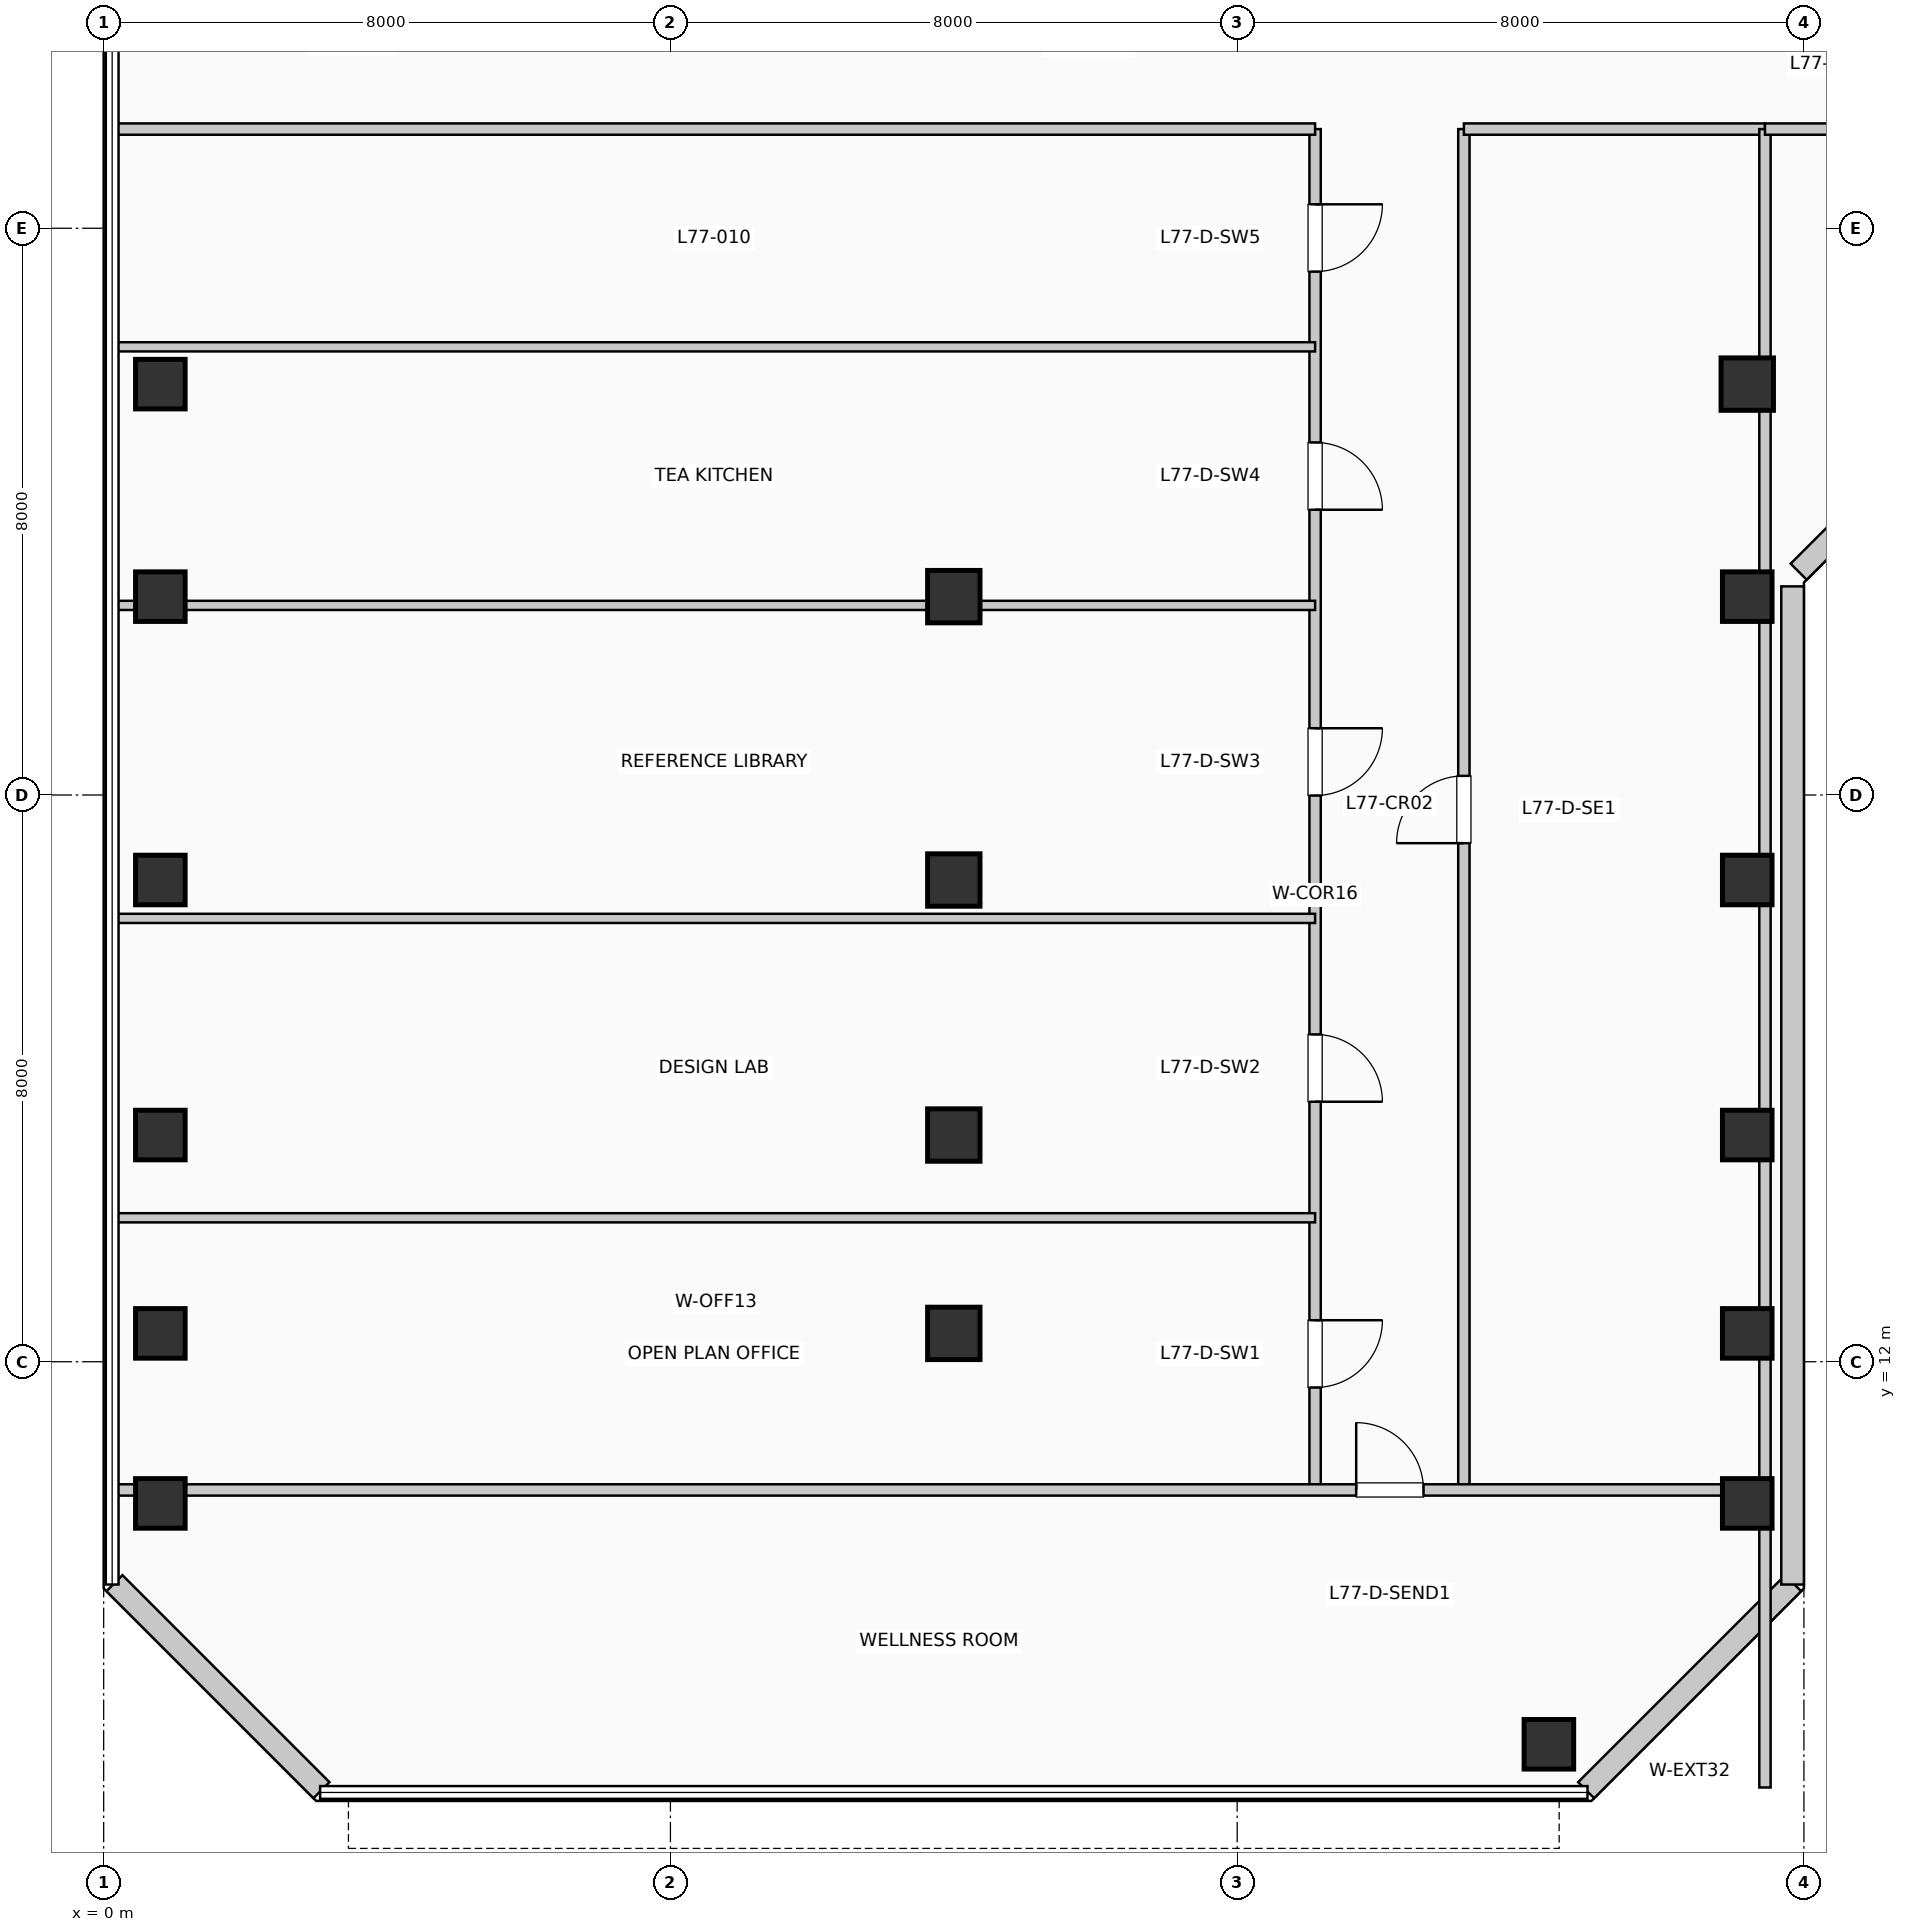
"""IFC4 building model, lengths in metres.
Left out: names, types, materials, properties, quantities, classifications, styles, units other than length and angle.
Written with IfcOpenShell. Run it as: python <this file> out.ifc"""

import sys

from ifc_helpers import new_model, si_unit, direction, frame, frame_2d, origin, origin_2d, place, context, subcontext, project, spatial, rectangle, extrude, element, fill, save


model = new_model("IFC4")
c1 = context("Model", 3, precision=1e-05, world=origin(), true_north=direction((0.0, 1.0)))
c2 = subcontext(c1, "Body", "Model", "MODEL_VIEW")
j1 = project(units=[si_unit("LENGTHUNIT", "METRE"), si_unit("PLANEANGLEUNIT", "RADIAN")], contexts=[c1])
p1 = place(None, origin())
s1 = spatial("IfcSite", under=j1, at=p1, CompositionType="ELEMENT")
p2 = place(p1, origin())
s2 = spatial("IfcBuilding", under=s1, at=p2, CompositionType="ELEMENT")
p3 = place(p2, frame((0.0, 0.0, 315.81)))
s3 = spatial("IfcBuildingStorey", under=s2, at=p3, CompositionType="ELEMENT", Elevation=315.81)
for number, where, z_axis, x_axis in (
    (1, (0.8, 10.0, 0.0), (0.0, 0.0, 1.0), (1.0, 0.0, 0.0)),
    (2, (0.8, 12.4, 0.0), (0.0, 0.0, 1.0), (1.0, 0.0, 0.0)),
    (3, (0.8, 15.2, 0.0), (0.0, 0.0, 1.0), (1.0, 0.0, 0.0)),
    (4, (0.8, 18.8, 0.0), (0.0, 0.0, 1.0), (1.0, 0.0, 0.0)),
    (5, (0.8, 22.8, 0.0), (0.0, 0.0, 1.0), (1.0, 0.0, 0.0)),
    (6, (0.8, 25.8, 0.0), (0.0, 0.0, 1.0), (1.0, 0.0, 0.0)),
):
    element("IfcColumn", number, at=place(p3, frame(where, z_axis=z_axis, x_axis=x_axis)), inside=s3, PredefinedType="COLUMN", context=c2, shape_type="SweptSolid", body=[
        extrude(rectangle(XDim=0.7, YDim=0.7, at=origin_2d()), origin(), (0.0, 0.0, 1.0), 3.96),
    ])
for number, where, z_axis, x_axis in (
    (7, (12.0, 12.4, 0.0), (0.0, 0.0, 1.0), (1.0, 0.0, 0.0)),
    (8, (12.0, 15.2, 0.0), (0.0, 0.0, 1.0), (1.0, 0.0, 0.0)),
    (9, (12.0, 18.8, 0.0), (0.0, 0.0, 1.0), (1.0, 0.0, 0.0)),
    (10, (12.0, 22.8, 0.0), (0.0, 0.0, 1.0), (1.0, 0.0, 0.0)),
):
    element("IfcColumn", number, at=place(p3, frame(where, z_axis=z_axis, x_axis=x_axis)), inside=s3, PredefinedType="COLUMN", context=c2, shape_type="SweptSolid", body=[
        extrude(rectangle(XDim=0.74, YDim=0.74, at=origin_2d()), origin(), (0.0, 0.0, 1.0), 3.96),
    ])
for number, where, z_axis, x_axis in (
    (11, (20.4, 6.6, 0.0), (0.0, 0.0, 1.0), (1.0, 0.0, 0.0)),
    (12, (23.2, 10.0, 0.0), (0.0, 0.0, 1.0), (1.0, 0.0, 0.0)),
    (13, (23.2, 12.4, 0.0), (0.0, 0.0, 1.0), (1.0, 0.0, 0.0)),
    (14, (23.2, 15.2, 0.0), (0.0, 0.0, 1.0), (1.0, 0.0, 0.0)),
    (15, (23.2, 18.8, 0.0), (0.0, 0.0, 1.0), (1.0, 0.0, 0.0)),
    (16, (23.2, 22.8, 0.0), (0.0, 0.0, 1.0), (1.0, 0.0, 0.0)),
):
    element("IfcColumn", number, at=place(p3, frame(where, z_axis=z_axis, x_axis=x_axis)), inside=s3, PredefinedType="COLUMN", context=c2, shape_type="SweptSolid", body=[
        extrude(rectangle(XDim=0.7, YDim=0.7, at=origin_2d()), origin(), (0.0, 0.0, 1.0), 3.96),
    ])
p4 = place(p3, frame((23.2, 25.8, 0.0), z_axis=(0.0, 0.0, 1.0), x_axis=(1.0, 0.0, 0.0)))
e17 = element("IfcColumn", 17, at=p4, inside=s3, PredefinedType="COLUMN", context=c2, shape_type="SweptSolid", body=[
    extrude(rectangle(XDim=0.74, YDim=0.74, at=origin_2d()), origin(), (0.0, 0.0, 1.0), 3.96),
])
p5 = place(p3, frame((20.926, 5.952, 0.0), z_axis=(0.0, 0.0, 1.0), x_axis=(0.707077242712, 0.707136318428, 0.0)))
e18 = element("IfcWall", 18, at=p5, inside=s3, PredefinedType="SOLIDWALL", context=c2, shape_type="SweptSolid", body=[
    extrude(rectangle(XDim=4.133, YDim=0.32, at=frame_2d((2.066, 0.0))), origin(), (0.0, 0.0, 1.0), 3.74),
])
p6 = place(p3, frame((23.84, 8.855, 0.0), z_axis=(0.0, 0.0, 1.0), x_axis=(0.0, 1.0, 0.0)))
e19 = element("IfcWall", 19, at=p6, inside=s3, PredefinedType="SOLIDWALL", context=c2, shape_type="SweptSolid", body=[
    extrude(rectangle(XDim=14.09, YDim=0.32, at=frame_2d((7.045, 0.0))), origin(), (0.0, 0.0, 1.0), 3.74),
])
p7 = place(p3, frame((23.926, 23.152, 0.0), z_axis=(0.0, 0.0, 1.0), x_axis=(0.707106781187, 0.707106781187, 0.0)))
e20 = element("IfcWall", 20, at=p7, inside=s3, PredefinedType="SOLIDWALL", context=c2, shape_type="SweptSolid", body=[
    extrude(rectangle(XDim=2.718, YDim=0.32, at=frame_2d((1.359, 0.0))), origin(), (0.0, 0.0, 1.0), 3.74),
])
p8 = place(p3, frame((0.152, 8.874, 0.0), z_axis=(0.0, 0.0, 1.0), x_axis=(0.707077242712, -0.707136318428, 0.0)))
e21 = element("IfcWall", 21, at=p8, inside=s3, PredefinedType="SOLIDWALL", context=c2, shape_type="SweptSolid", body=[
    extrude(rectangle(XDim=4.133, YDim=0.32, at=frame_2d((2.066, 0.0))), origin(), (0.0, 0.0, 1.0), 3.74),
])
p9 = place(p3, frame((17.1, 10.19, 0.0), z_axis=(0.0, 0.0, 1.0), x_axis=(0.0, 1.0, 0.0)))
e22 = element("IfcWall", 22, at=p9, inside=s3, PredefinedType="PARTITIONING", context=c2, shape_type="SweptSolid", body=[
    extrude(rectangle(XDim=19.21, YDim=0.16, at=frame_2d((9.605, 0.0))), origin(), (0.0, 0.0, 1.0), 3.74),
])
p10 = place(p9, frame((2.396, 0.0, 0.0), z_axis=(0.0, 0.0, 1.0), x_axis=(-1.0, 0.0, 0.0)))
e23 = element("IfcOpeningElement", 23, at=p10, cuts=e22, PredefinedType="OPENING", context=c2, shape_type="SweptSolid", body=[
    extrude(rectangle(XDim=0.95, YDim=2.15, at=frame_2d((0.475, 1.075))), frame((0.0, 0.09, 0.0), z_axis=(0.0, -1.0, 0.0), x_axis=(1.0, 0.0, 0.0)), (0.0, 0.0, 1.0), 0.18),
])
p11 = place(p9, frame((6.43, 0.0, 0.0), z_axis=(0.0, 0.0, 1.0), x_axis=(-1.0, 0.0, 0.0)))
e24 = element("IfcOpeningElement", 24, at=p11, cuts=e22, PredefinedType="OPENING", context=c2, shape_type="SweptSolid", body=[
    extrude(rectangle(XDim=0.95, YDim=2.15, at=frame_2d((0.475, 1.075))), frame((0.0, 0.09, 0.0), z_axis=(0.0, -1.0, 0.0), x_axis=(1.0, 0.0, 0.0)), (0.0, 0.0, 1.0), 0.18),
])
p12 = place(p9, frame((10.752, 0.0, 0.0), z_axis=(0.0, 0.0, 1.0), x_axis=(-1.0, 0.0, 0.0)))
e25 = element("IfcOpeningElement", 25, at=p12, cuts=e22, PredefinedType="OPENING", context=c2, shape_type="SweptSolid", body=[
    extrude(rectangle(XDim=0.95, YDim=2.15, at=frame_2d((0.475, 1.075))), frame((0.0, 0.09, 0.0), z_axis=(0.0, -1.0, 0.0), x_axis=(1.0, 0.0, 0.0)), (0.0, 0.0, 1.0), 0.18),
])
p13 = place(p9, frame((14.786, 0.0, 0.0), z_axis=(0.0, 0.0, 1.0), x_axis=(-1.0, 0.0, 0.0)))
e26 = element("IfcOpeningElement", 26, at=p13, cuts=e22, PredefinedType="OPENING", context=c2, shape_type="SweptSolid", body=[
    extrude(rectangle(XDim=0.95, YDim=2.15, at=frame_2d((0.475, 1.075))), frame((0.0, 0.09, 0.0), z_axis=(0.0, -1.0, 0.0), x_axis=(1.0, 0.0, 0.0)), (0.0, 0.0, 1.0), 0.18),
])
p14 = place(p9, frame((18.148, 0.0, 0.0), z_axis=(0.0, 0.0, 1.0), x_axis=(-1.0, 0.0, 0.0)))
e27 = element("IfcOpeningElement", 27, at=p14, cuts=e22, PredefinedType="OPENING", context=c2, shape_type="SweptSolid", body=[
    extrude(rectangle(XDim=0.95, YDim=2.15, at=frame_2d((0.475, 1.075))), frame((0.0, 0.09, 0.0), z_axis=(0.0, -1.0, 0.0), x_axis=(1.0, 0.0, 0.0)), (0.0, 0.0, 1.0), 0.18),
])
p15 = place(p3, frame((19.2, 10.19, 0.0), z_axis=(0.0, 0.0, 1.0), x_axis=(0.0, 1.0, 0.0)))
e28 = element("IfcWall", 28, at=p15, inside=s3, PredefinedType="PARTITIONING", context=c2, shape_type="SweptSolid", body=[
    extrude(rectangle(XDim=19.21, YDim=0.16, at=frame_2d((9.605, 0.0))), origin(), (0.0, 0.0, 1.0), 3.74),
])
p16 = place(p15, frame((9.13, 0.0, 0.0)))
e29 = element("IfcOpeningElement", 29, at=p16, cuts=e28, PredefinedType="OPENING", context=c2, shape_type="SweptSolid", body=[
    extrude(rectangle(XDim=0.95, YDim=2.15, at=frame_2d((0.475, 1.075))), frame((0.0, 0.09, 0.0), z_axis=(0.0, -1.0, 0.0), x_axis=(1.0, 0.0, 0.0)), (0.0, 0.0, 1.0), 0.18),
])
p17 = place(p3, frame((0.19, 10.19, 0.0), z_axis=(0.0, 0.0, 1.0), x_axis=(1.0, 0.0, 0.0)))
e30 = element("IfcWall", 30, at=p17, inside=s3, PredefinedType="PARTITIONING", context=c2, shape_type="SweptSolid", body=[
    extrude(rectangle(XDim=23.26, YDim=0.16, at=frame_2d((11.63, 0.0))), origin(), (0.0, 0.0, 1.0), 3.175),
])
p18 = place(p17, frame((17.49, 0.0, 0.0)))
e31 = element("IfcOpeningElement", 31, at=p18, cuts=e30, PredefinedType="OPENING", context=c2, shape_type="SweptSolid", body=[
    extrude(rectangle(XDim=0.95, YDim=2.15, at=frame_2d((0.475, 1.075))), frame((0.0, 0.09, 0.0), z_axis=(0.0, -1.0, 0.0), x_axis=(1.0, 0.0, 0.0)), (0.0, 0.0, 1.0), 0.18),
])
p19 = place(p3, frame((0.19, 29.4, 0.0), z_axis=(0.0, 0.0, 1.0), x_axis=(1.0, 0.0, 0.0)))
e32 = element("IfcWall", 32, at=p19, inside=s3, PredefinedType="PARTITIONING", context=c2, shape_type="SweptSolid", body=[
    extrude(rectangle(XDim=16.91, YDim=0.16, at=frame_2d((8.455, 0.0))), origin(), (0.0, 0.0, 1.0), 3.425),
])
p20 = place(p3, frame((19.2, 29.4, 0.0), z_axis=(0.0, 0.0, 1.0), x_axis=(1.0, 0.0, 0.0)))
e33 = element("IfcWall", 33, at=p20, inside=s3, PredefinedType="PARTITIONING", context=c2, shape_type="SweptSolid", body=[
    extrude(rectangle(XDim=4.25, YDim=0.16, at=frame_2d((2.125, 0.0))), origin(), (0.0, 0.0, 1.0), 3.425),
])
p21 = place(p3, frame((23.45, 5.99, 0.0), z_axis=(0.0, 0.0, 1.0), x_axis=(0.0, 1.0, 0.0)))
e34 = element("IfcWall", 34, at=p21, inside=s3, PredefinedType="PARTITIONING", context=c2, shape_type="SweptSolid", body=[
    extrude(rectangle(XDim=23.41, YDim=0.16, at=frame_2d((11.705, 0.0))), origin(), (0.0, 0.0, 1.0), 3.175),
])
for number, where, z_axis, x_axis in (
    (35, (0.19, 14.032, 0.0), (0.0, 0.0, 1.0), (1.0, 0.0, 0.0)),
    (36, (0.19, 18.258, 0.0), (0.0, 0.0, 1.0), (1.0, 0.0, 0.0)),
):
    element("IfcWall", number, at=place(p3, frame(where, z_axis=z_axis, x_axis=x_axis)), inside=s3, PredefinedType="PARTITIONING", context=c2, shape_type="SweptSolid", body=[
        extrude(rectangle(XDim=16.91, YDim=0.13, at=frame_2d((8.455, 0.0))), origin(), (0.0, 0.0, 1.0), 3.74),
    ])
p22 = place(p3, frame((0.19, 22.677, 0.0), z_axis=(0.0, 0.0, 1.0), x_axis=(1.0, 0.0, 0.0)))
e37 = element("IfcWall", 37, at=p22, inside=s3, PredefinedType="PARTITIONING", context=c2, shape_type="SweptSolid", body=[
    extrude(rectangle(XDim=16.91, YDim=0.13, at=frame_2d((8.455, 0.0))), origin(), (0.0, 0.0, 1.0), 3.175),
])
p23 = place(p3, frame((0.19, 26.326, 0.0), z_axis=(0.0, 0.0, 1.0), x_axis=(1.0, 0.0, 0.0)))
e38 = element("IfcWall", 38, at=p23, inside=s3, PredefinedType="PARTITIONING", context=c2, shape_type="SweptSolid", body=[
    extrude(rectangle(XDim=16.91, YDim=0.13, at=frame_2d((8.455, 0.0))), origin(), (0.0, 0.0, 1.0), 3.74),
])
p24 = place(p3, frame((23.45, 29.4, 0.0), z_axis=(0.0, 0.0, 1.0), x_axis=(1.0, 0.0, 0.0)))
e39 = element("IfcWall", 39, at=p24, inside=s3, PredefinedType="PARTITIONING", context=c2, shape_type="SweptSolid", body=[
    extrude(rectangle(XDim=4.15, YDim=0.16, at=frame_2d((2.075, 0.0))), origin(), (0.0, 0.0, 1.0), 3.425),
])
p25 = place(p18, origin())
e40 = element("IfcDoor", 40, at=p25, inside=s3, OperationType="SINGLE_SWING_LEFT", PredefinedType="DOOR", context=c2, shape_type="SweptSolid", body=[
    extrude(rectangle(XDim=0.95, YDim=2.15, at=frame_2d((0.475, 1.075))), frame((0.0, 0.025, 0.0), z_axis=(0.0, -1.0, 0.0), x_axis=(1.0, 0.0, 0.0)), (0.0, 0.0, 1.0), 0.05),
])
fill(e31, e40)
p26 = place(p10, origin())
e41 = element("IfcDoor", 41, at=p26, inside=s3, OperationType="SINGLE_SWING_RIGHT", PredefinedType="DOOR", context=c2, shape_type="SweptSolid", body=[
    extrude(rectangle(XDim=0.95, YDim=2.15, at=frame_2d((0.475, 1.075))), frame((0.0, 0.025, 0.0), z_axis=(0.0, -1.0, 0.0), x_axis=(1.0, 0.0, 0.0)), (0.0, 0.0, 1.0), 0.05),
])
fill(e23, e41)
p27 = place(p11, origin())
e42 = element("IfcDoor", 42, at=p27, inside=s3, OperationType="SINGLE_SWING_LEFT", PredefinedType="DOOR", context=c2, shape_type="SweptSolid", body=[
    extrude(rectangle(XDim=0.95, YDim=2.15, at=frame_2d((0.475, 1.075))), frame((0.0, 0.025, 0.0), z_axis=(0.0, -1.0, 0.0), x_axis=(1.0, 0.0, 0.0)), (0.0, 0.0, 1.0), 0.05),
])
fill(e24, e42)
p28 = place(p12, origin())
e43 = element("IfcDoor", 43, at=p28, inside=s3, OperationType="SINGLE_SWING_RIGHT", PredefinedType="DOOR", context=c2, shape_type="SweptSolid", body=[
    extrude(rectangle(XDim=0.95, YDim=2.15, at=frame_2d((0.475, 1.075))), frame((0.0, 0.025, 0.0), z_axis=(0.0, -1.0, 0.0), x_axis=(1.0, 0.0, 0.0)), (0.0, 0.0, 1.0), 0.05),
])
fill(e25, e43)
p29 = place(p13, origin())
e44 = element("IfcDoor", 44, at=p29, inside=s3, OperationType="SINGLE_SWING_LEFT", PredefinedType="DOOR", context=c2, shape_type="SweptSolid", body=[
    extrude(rectangle(XDim=0.95, YDim=2.15, at=frame_2d((0.475, 1.075))), frame((0.0, 0.025, 0.0), z_axis=(0.0, -1.0, 0.0), x_axis=(1.0, 0.0, 0.0)), (0.0, 0.0, 1.0), 0.05),
])
fill(e26, e44)
p30 = place(p14, origin())
e45 = element("IfcDoor", 45, at=p30, inside=s3, OperationType="SINGLE_SWING_RIGHT", PredefinedType="DOOR", context=c2, shape_type="SweptSolid", body=[
    extrude(rectangle(XDim=0.95, YDim=2.15, at=frame_2d((0.475, 1.075))), frame((0.0, 0.025, 0.0), z_axis=(0.0, -1.0, 0.0), x_axis=(1.0, 0.0, 0.0)), (0.0, 0.0, 1.0), 0.05),
])
fill(e27, e45)
p31 = place(p16, origin())
e46 = element("IfcDoor", 46, at=p31, inside=s3, OperationType="SINGLE_SWING_LEFT", PredefinedType="DOOR", context=c2, shape_type="SweptSolid", body=[
    extrude(rectangle(XDim=0.95, YDim=2.15, at=frame_2d((0.475, 1.075))), frame((0.0, 0.025, 0.0), z_axis=(0.0, -1.0, 0.0), x_axis=(1.0, 0.0, 0.0)), (0.0, 0.0, 1.0), 0.05),
])
fill(e29, e46)
save(model, sys.argv[1])
